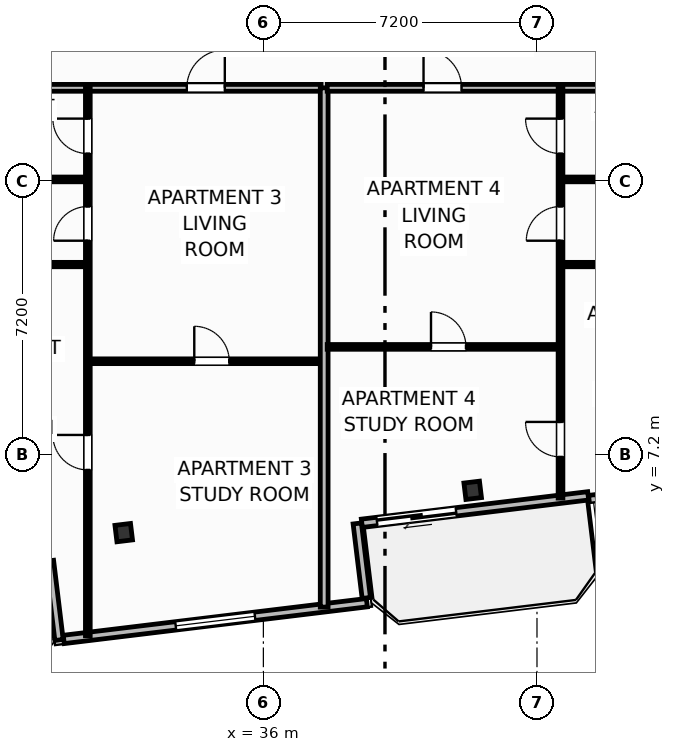
"""IFC4 building model, lengths in metres.
Left out: names, types, materials, properties, quantities, classifications, styles, units other than length and angle.
Written with IfcOpenShell. Run it as: python <this file> out.ifc"""

import sys

from ifc_helpers import new_model, si_unit, direction, frame, frame_2d, origin, origin_2d, place, context, subcontext, project, spatial, rectangle, i_section, extrude, element, fill, save


model = new_model("IFC4")
c1 = context("Model", 3, precision=1e-05, world=origin(), true_north=direction((0.0, 1.0)))
c2 = subcontext(c1, "Body", "Model", "MODEL_VIEW")
j1 = project(units=[si_unit("LENGTHUNIT", "METRE"), si_unit("PLANEANGLEUNIT", "RADIAN")], contexts=[c1])
p1 = place(None, origin())
s1 = spatial("IfcSite", under=j1, at=p1, CompositionType="ELEMENT")
p2 = place(p1, origin())
s2 = spatial("IfcBuilding", under=s1, at=p2, CompositionType="ELEMENT")
p3 = place(p2, frame((0.0, 0.0, 174.6)))
s3 = spatial("IfcBuildingStorey", under=s2, at=p3, CompositionType="ELEMENT", Elevation=174.6)
for number, where, z_axis, x_axis in (
    (1, (32.325, 5.146, 0.0), (0.0, 0.0, 1.0), (0.993, 0.12, 0.0)),
    (2, (41.508, 6.26, 0.0), (0.0, 0.0, 1.0), (0.993, 0.12, 0.0)),
):
    element("IfcColumn", number, at=place(p3, frame(where, z_axis=z_axis, x_axis=x_axis)), inside=s3, PredefinedType="COLUMN", context=c2, shape_type="SweptSolid", body=[
        extrude(i_section(OverallWidth=0.412, OverallDepth=0.435, WebThickness=0.036, FlangeThickness=0.057, FilletRadius=0.025, at=origin_2d()), origin(), (0.0, 0.0, 1.0), 3.7),
    ])
p4 = place(p3, frame((44.548, 6.114, 0.0), z_axis=(0.0, 0.0, 1.0), x_axis=(-0.992735402148, -0.120318000826, 0.0)))
e3 = element("IfcWall", 3, at=p4, inside=s3, PredefinedType="SOLIDWALL", context=c2, shape_type="SweptSolid", body=[
    extrude(rectangle(XDim=6.0, YDim=0.22, at=frame_2d((3.0, 0.0))), origin(), (0.0, 0.0, 1.0), 2.73),
])
p5 = place(p4, frame((3.5, 0.0, 0.0)))
e4 = element("IfcOpeningElement", 4, at=p5, cuts=e3, PredefinedType="OPENING", context=c2, shape_type="SweptSolid", body=[
    extrude(rectangle(XDim=2.1, YDim=2.3, at=frame_2d((1.05, 1.15))), frame((0.0, 0.12, 0.0), z_axis=(0.0, -1.0, 0.0), x_axis=(1.0, 0.0, 0.0)), (0.0, 0.0, 1.0), 0.24),
])
p6 = place(p3, frame((30.37, 4.406, 0.0), z_axis=(0.0, 0.0, 1.0), x_axis=(0.120327895535, -0.992734202874, 0.0)))
e5 = element("IfcWall", 5, at=p6, inside=s3, PredefinedType="SOLIDWALL", context=c2, shape_type="SweptSolid", body=[
    extrude(rectangle(XDim=2.1, YDim=0.22, at=frame_2d((1.05, 0.0))), origin(), (0.0, 0.0, 1.0), 2.73),
])
p7 = place(p3, frame((30.747, 2.336, 0.0), z_axis=(0.0, 0.0, 1.0), x_axis=(0.992731032022, 0.120354052946, 0.0)))
e6 = element("IfcWall", 6, at=p7, inside=s3, PredefinedType="SOLIDWALL", context=c2, shape_type="SweptSolid", body=[
    extrude(rectangle(XDim=8.035, YDim=0.22, at=frame_2d((4.018, 0.0))), origin(), (0.0, 0.0, 1.0), 2.73),
])
p8 = place(p7, frame((2.968, 0.0, 0.8)))
e7 = element("IfcOpeningElement", 7, at=p8, cuts=e6, PredefinedType="OPENING", context=c2, shape_type="SweptSolid", body=[
    extrude(rectangle(XDim=2.1, YDim=1.75, at=frame_2d((1.05, 0.875))), frame((0.0, 0.12, 0.0), z_axis=(0.0, -1.0, 0.0), x_axis=(1.0, 0.0, 0.0)), (0.0, 0.0, 1.0), 0.24),
])
p9 = place(p3, frame((38.709, 3.427, 0.0), z_axis=(0.0, 0.0, 1.0), x_axis=(-0.120397815541, 0.992725725472, 0.0)))
e8 = element("IfcWall", 8, at=p9, inside=s3, PredefinedType="SOLIDWALL", context=c2, shape_type="SweptSolid", body=[
    extrude(rectangle(XDim=1.975, YDim=0.22, at=frame_2d((0.988, 0.0))), origin(), (0.0, 0.0, 1.0), 2.73),
])
p10 = place(p3, frame((44.666, 6.138, 0.0), z_axis=(0.0, 0.0, 1.0), x_axis=(0.120327895535, -0.992734202874, 0.0)))
e9 = element("IfcWall", 9, at=p10, inside=s3, PredefinedType="SOLIDWALL", context=c2, shape_type="SweptSolid", body=[
    extrude(rectangle(XDim=2.1, YDim=0.22, at=frame_2d((1.05, 0.0))), origin(), (0.0, 0.0, 1.0), 2.73),
])
p11 = place(p10, frame((0.2, 0.0, 0.8)))
e10 = element("IfcOpeningElement", 10, at=p11, cuts=e9, PredefinedType="OPENING", context=c2, shape_type="SweptSolid", body=[
    extrude(rectangle(XDim=1.15, YDim=1.4, at=frame_2d((0.575, 0.7))), frame((0.0, 0.12, 0.0), z_axis=(0.0, -1.0, 0.0), x_axis=(1.0, 0.0, 0.0)), (0.0, 0.0, 1.0), 0.24),
])
p12 = place(p3, frame((31.451, 9.656, 0.0), z_axis=(0.0, 0.0, 1.0), x_axis=(1.0, 0.0, 0.0)))
e11 = element("IfcWall", 11, at=p12, inside=s3, PredefinedType="PARTITIONING", context=c2, shape_type="SweptSolid", body=[
    extrude(rectangle(XDim=6.069, YDim=0.125, at=frame_2d((3.035, 0.0))), origin(), (0.0, 0.0, 1.0), 3.45),
])
p13 = place(p12, frame((2.731, 0.0, 0.0)))
e12 = element("IfcOpeningElement", 12, at=p13, cuts=e11, PredefinedType="OPENING", context=c2, shape_type="SweptSolid", body=[
    extrude(rectangle(XDim=0.92, YDim=2.05, at=frame_2d((0.46, 1.025))), frame((0.0, 0.073, 0.0), z_axis=(0.0, -1.0, 0.0), x_axis=(1.0, 0.0, 0.0)), (0.0, 0.0, 1.0), 0.145),
])
p14 = place(p3, frame((26.88, 16.85, 0.0), z_axis=(0.0, 0.0, 1.0), x_axis=(1.0, 0.0, 0.0)))
e13 = element("IfcWall", 13, at=p14, inside=s3, PredefinedType="PARTITIONING", context=c2, shape_type="SweptSolid", body=[
    extrude(rectangle(XDim=10.64, YDim=0.18, at=frame_2d((5.32, 0.0))), origin(), (0.0, 0.0, 1.0), 3.45),
])
p15 = place(p14, frame((7.105, 0.0, 0.0)))
e14 = element("IfcOpeningElement", 14, at=p15, cuts=e13, PredefinedType="OPENING", context=c2, shape_type="SweptSolid", body=[
    extrude(rectangle(XDim=1.0, YDim=2.2, at=frame_2d((0.5, 1.1))), frame((0.0, 0.1, 0.0), z_axis=(0.0, -1.0, 0.0), x_axis=(1.0, 0.0, 0.0)), (0.0, 0.0, 1.0), 0.2),
])
p16 = place(p3, frame((31.381, 2.433, 0.0), z_axis=(0.0, 0.0, 1.0), x_axis=(0.0, 1.0, 0.0)))
e15 = element("IfcWall", 15, at=p16, inside=s3, PredefinedType="PARTITIONING", context=c2, shape_type="SweptSolid", body=[
    extrude(rectangle(XDim=14.417, YDim=0.125, at=frame_2d((7.208, 0.0))), origin(), (0.0, 0.0, 1.0), 3.45),
])
p17 = place(p16, frame((4.364, 0.0, 0.0)))
e16 = element("IfcOpeningElement", 16, at=p17, cuts=e15, PredefinedType="OPENING", context=c2, shape_type="SweptSolid", body=[
    extrude(rectangle(XDim=0.92, YDim=2.05, at=frame_2d((0.46, 1.025))), frame((0.0, 0.073, 0.0), z_axis=(0.0, -1.0, 0.0), x_axis=(1.0, 0.0, 0.0)), (0.0, 0.0, 1.0), 0.145),
])
p18 = place(p16, frame((10.395, 0.0, 0.0)))
e17 = element("IfcOpeningElement", 17, at=p18, cuts=e15, PredefinedType="OPENING", context=c2, shape_type="SweptSolid", body=[
    extrude(rectangle(XDim=0.9, YDim=2.05, at=frame_2d((0.45, 1.025))), frame((0.0, 0.073, 0.0), z_axis=(0.0, -1.0, 0.0), x_axis=(1.0, 0.0, 0.0)), (0.0, 0.0, 1.0), 0.145),
])
p19 = place(p16, frame((12.687, 0.0, 0.0)))
e18 = element("IfcOpeningElement", 18, at=p19, cuts=e15, PredefinedType="OPENING", context=c2, shape_type="SweptSolid", body=[
    extrude(rectangle(XDim=0.92, YDim=2.05, at=frame_2d((0.46, 1.025))), frame((0.0, 0.073, 0.0), z_axis=(0.0, -1.0, 0.0), x_axis=(1.0, 0.0, 0.0)), (0.0, 0.0, 1.0), 0.145),
])
p20 = place(p3, frame((26.88, 14.44, 0.0), z_axis=(0.0, 0.0, 1.0), x_axis=(1.0, 0.0, 0.0)))
e19 = element("IfcWall", 19, at=p20, inside=s3, PredefinedType="PARTITIONING", context=c2, shape_type="SweptSolid", body=[
    extrude(rectangle(XDim=4.431, YDim=0.125, at=frame_2d((2.215, 0.0))), origin(), (0.0, 0.0, 1.0), 3.45),
])
p21 = place(p3, frame((26.88, 12.2, 0.0), z_axis=(0.0, 0.0, 1.0), x_axis=(1.0, 0.0, 0.0)))
e20 = element("IfcWall", 20, at=p21, inside=s3, PredefinedType="PARTITIONING", context=c2, shape_type="SweptSolid", body=[
    extrude(rectangle(XDim=4.431, YDim=0.115, at=frame_2d((2.215, 0.0))), origin(), (0.0, 0.0, 1.0), 3.45),
])
p22 = place(p3, frame((37.6, 3.187, 0.0), z_axis=(0.0, 0.0, 1.0), x_axis=(0.0, 1.0, 0.0)))
e21 = element("IfcWall", 21, at=p22, inside=s3, PredefinedType="PARTITIONING", context=c2, shape_type="SweptSolid", body=[
    extrude(rectangle(XDim=13.663, YDim=0.205, at=frame_2d((6.832, 0.0))), origin(), (0.0, 0.0, 1.0), 3.45),
])
p23 = place(p3, frame((37.68, 10.033, 0.0), z_axis=(0.0, 0.0, 1.0), x_axis=(1.0, 0.0, 0.0)))
e22 = element("IfcWall", 22, at=p23, inside=s3, PredefinedType="PARTITIONING", context=c2, shape_type="SweptSolid", body=[
    extrude(rectangle(XDim=6.069, YDim=0.125, at=frame_2d((3.035, 0.0))), origin(), (0.0, 0.0, 1.0), 3.45),
])
p24 = place(p23, frame((2.731, 0.0, 0.0)))
e23 = element("IfcOpeningElement", 23, at=p24, cuts=e22, PredefinedType="OPENING", context=c2, shape_type="SweptSolid", body=[
    extrude(rectangle(XDim=0.92, YDim=2.05, at=frame_2d((0.46, 1.025))), frame((0.0, 0.073, 0.0), z_axis=(0.0, -1.0, 0.0), x_axis=(1.0, 0.0, 0.0)), (0.0, 0.0, 1.0), 0.145),
])
p25 = place(p3, frame((37.68, 16.85, 0.0), z_axis=(0.0, 0.0, 1.0), x_axis=(1.0, 0.0, 0.0)))
e24 = element("IfcWall", 24, at=p25, inside=s3, PredefinedType="PARTITIONING", context=c2, shape_type="SweptSolid", body=[
    extrude(rectangle(XDim=10.64, YDim=0.18, at=frame_2d((5.32, 0.0))), origin(), (0.0, 0.0, 1.0), 3.45),
])
p26 = place(p25, frame((2.535, 0.0, 0.0)))
e25 = element("IfcOpeningElement", 25, at=p26, cuts=e24, PredefinedType="OPENING", context=c2, shape_type="SweptSolid", body=[
    extrude(rectangle(XDim=1.0, YDim=2.2, at=frame_2d((0.5, 1.1))), frame((0.0, 0.1, 0.0), z_axis=(0.0, -1.0, 0.0), x_axis=(1.0, 0.0, 0.0)), (0.0, 0.0, 1.0), 0.2),
])
p27 = place(p3, frame((43.819, 6.056, 0.0), z_axis=(0.0, 0.0, 1.0), x_axis=(0.0, 1.0, 0.0)))
e26 = element("IfcWall", 26, at=p27, inside=s3, PredefinedType="PARTITIONING", context=c2, shape_type="SweptSolid", body=[
    extrude(rectangle(XDim=10.794, YDim=0.125, at=frame_2d((5.397, 0.0))), origin(), (0.0, 0.0, 1.0), 2.662),
])
p28 = place(p27, frame((1.083, 0.0, 0.0)))
e27 = element("IfcOpeningElement", 27, at=p28, cuts=e26, PredefinedType="OPENING", context=c2, shape_type="SweptSolid", body=[
    extrude(rectangle(XDim=0.92, YDim=2.05, at=frame_2d((0.46, 1.025))), frame((0.0, 0.073, 0.0), z_axis=(0.0, -1.0, 0.0), x_axis=(1.0, 0.0, 0.0)), (0.0, 0.0, 1.0), 0.145),
])
p29 = place(p27, frame((6.771, 0.0, 0.0)))
e28 = element("IfcOpeningElement", 28, at=p29, cuts=e26, PredefinedType="OPENING", context=c2, shape_type="SweptSolid", body=[
    extrude(rectangle(XDim=0.9, YDim=2.05, at=frame_2d((0.45, 1.025))), frame((0.0, 0.073, 0.0), z_axis=(0.0, -1.0, 0.0), x_axis=(1.0, 0.0, 0.0)), (0.0, 0.0, 1.0), 0.145),
])
p30 = place(p27, frame((9.064, 0.0, 0.0)))
e29 = element("IfcOpeningElement", 29, at=p30, cuts=e26, PredefinedType="OPENING", context=c2, shape_type="SweptSolid", body=[
    extrude(rectangle(XDim=0.92, YDim=2.05, at=frame_2d((0.46, 1.025))), frame((0.0, 0.073, 0.0), z_axis=(0.0, -1.0, 0.0), x_axis=(1.0, 0.0, 0.0)), (0.0, 0.0, 1.0), 0.145),
])
p31 = place(p3, frame((43.889, 14.44, 0.0), z_axis=(0.0, 0.0, 1.0), x_axis=(1.0, 0.0, 0.0)))
e30 = element("IfcWall", 30, at=p31, inside=s3, PredefinedType="PARTITIONING", context=c2, shape_type="SweptSolid", body=[
    extrude(rectangle(XDim=4.431, YDim=0.125, at=frame_2d((2.215, 0.0))), origin(), (0.0, 0.0, 1.0), 3.45),
])
p32 = place(p3, frame((43.889, 12.2, 0.0), z_axis=(0.0, 0.0, 1.0), x_axis=(1.0, 0.0, 0.0)))
e31 = element("IfcWall", 31, at=p32, inside=s3, PredefinedType="PARTITIONING", context=c2, shape_type="SweptSolid", body=[
    extrude(rectangle(XDim=4.431, YDim=0.115, at=frame_2d((2.215, 0.0))), origin(), (0.0, 0.0, 1.0), 3.45),
])
p33 = place(p5, origin())
e32 = element("IfcDoor", 32, at=p33, inside=s3, OperationType="SLIDING_TO_LEFT", PredefinedType="DOOR", context=c2, shape_type="SweptSolid", body=[
    extrude(rectangle(XDim=2.1, YDim=2.3, at=frame_2d((1.05, 1.15))), frame((0.0, 0.025, 0.0), z_axis=(0.0, -1.0, 0.0), x_axis=(1.0, 0.0, 0.0)), (0.0, 0.0, 1.0), 0.05),
])
fill(e4, e32)
p34 = place(p8, origin())
e33 = element("IfcWindow", 33, at=p34, inside=s3, PartitioningType="SINGLE_PANEL", PredefinedType="WINDOW", context=c2, shape_type="SweptSolid", body=[
    extrude(rectangle(XDim=2.1, YDim=1.75, at=frame_2d((1.05, 0.875))), frame((0.0, 0.03, 0.0), z_axis=(0.0, -1.0, 0.0), x_axis=(1.0, 0.0, 0.0)), (0.0, 0.0, 1.0), 0.06),
])
fill(e7, e33)
p35 = place(p13, origin())
e34 = element("IfcDoor", 34, at=p35, inside=s3, OperationType="SINGLE_SWING_LEFT", PredefinedType="DOOR", context=c2, shape_type="SweptSolid", body=[
    extrude(rectangle(XDim=0.92, YDim=2.05, at=frame_2d((0.46, 1.025))), frame((0.0, 0.025, 0.0), z_axis=(0.0, -1.0, 0.0), x_axis=(1.0, 0.0, 0.0)), (0.0, 0.0, 1.0), 0.05),
])
fill(e12, e34)
p36 = place(p15, origin())
e35 = element("IfcDoor", 35, at=p36, inside=s3, OperationType="SINGLE_SWING_RIGHT", PredefinedType="DOOR", context=c2, shape_type="SweptSolid", body=[
    extrude(rectangle(XDim=1.0, YDim=2.2, at=frame_2d((0.5, 1.1))), frame((0.0, 0.025, 0.0), z_axis=(0.0, -1.0, 0.0), x_axis=(1.0, 0.0, 0.0)), (0.0, 0.0, 1.0), 0.05),
])
fill(e14, e35)
p37 = place(p17, origin())
e36 = element("IfcDoor", 36, at=p37, inside=s3, OperationType="SINGLE_SWING_RIGHT", PredefinedType="DOOR", context=c2, shape_type="SweptSolid", body=[
    extrude(rectangle(XDim=0.92, YDim=2.05, at=frame_2d((0.46, 1.025))), frame((0.0, 0.025, 0.0), z_axis=(0.0, -1.0, 0.0), x_axis=(1.0, 0.0, 0.0)), (0.0, 0.0, 1.0), 0.05),
])
fill(e16, e36)
p38 = place(p18, origin())
e37 = element("IfcDoor", 37, at=p38, inside=s3, OperationType="SINGLE_SWING_LEFT", PredefinedType="DOOR", context=c2, shape_type="SweptSolid", body=[
    extrude(rectangle(XDim=0.9, YDim=2.05, at=frame_2d((0.45, 1.025))), frame((0.0, 0.025, 0.0), z_axis=(0.0, -1.0, 0.0), x_axis=(1.0, 0.0, 0.0)), (0.0, 0.0, 1.0), 0.05),
])
fill(e17, e37)
p39 = place(p19, origin())
e38 = element("IfcDoor", 38, at=p39, inside=s3, OperationType="SINGLE_SWING_RIGHT", PredefinedType="DOOR", context=c2, shape_type="SweptSolid", body=[
    extrude(rectangle(XDim=0.92, YDim=2.05, at=frame_2d((0.46, 1.025))), frame((0.0, 0.025, 0.0), z_axis=(0.0, -1.0, 0.0), x_axis=(1.0, 0.0, 0.0)), (0.0, 0.0, 1.0), 0.05),
])
fill(e18, e38)
p40 = place(p24, origin())
e39 = element("IfcDoor", 39, at=p40, inside=s3, OperationType="SINGLE_SWING_LEFT", PredefinedType="DOOR", context=c2, shape_type="SweptSolid", body=[
    extrude(rectangle(XDim=0.92, YDim=2.05, at=frame_2d((0.46, 1.025))), frame((0.0, 0.025, 0.0), z_axis=(0.0, -1.0, 0.0), x_axis=(1.0, 0.0, 0.0)), (0.0, 0.0, 1.0), 0.05),
])
fill(e23, e39)
p41 = place(p26, origin())
e40 = element("IfcDoor", 40, at=p41, inside=s3, OperationType="SINGLE_SWING_LEFT", PredefinedType="DOOR", context=c2, shape_type="SweptSolid", body=[
    extrude(rectangle(XDim=1.0, YDim=2.2, at=frame_2d((0.5, 1.1))), frame((0.0, 0.025, 0.0), z_axis=(0.0, -1.0, 0.0), x_axis=(1.0, 0.0, 0.0)), (0.0, 0.0, 1.0), 0.05),
])
fill(e25, e40)
p42 = place(p28, origin())
e41 = element("IfcDoor", 41, at=p42, inside=s3, OperationType="SINGLE_SWING_RIGHT", PredefinedType="DOOR", context=c2, shape_type="SweptSolid", body=[
    extrude(rectangle(XDim=0.92, YDim=2.05, at=frame_2d((0.46, 1.025))), frame((0.0, 0.025, 0.0), z_axis=(0.0, -1.0, 0.0), x_axis=(1.0, 0.0, 0.0)), (0.0, 0.0, 1.0), 0.05),
])
fill(e27, e41)
p43 = place(p29, origin())
e42 = element("IfcDoor", 42, at=p43, inside=s3, OperationType="SINGLE_SWING_LEFT", PredefinedType="DOOR", context=c2, shape_type="SweptSolid", body=[
    extrude(rectangle(XDim=0.9, YDim=2.05, at=frame_2d((0.45, 1.025))), frame((0.0, 0.025, 0.0), z_axis=(0.0, -1.0, 0.0), x_axis=(1.0, 0.0, 0.0)), (0.0, 0.0, 1.0), 0.05),
])
fill(e28, e42)
p44 = place(p30, origin())
e43 = element("IfcDoor", 43, at=p44, inside=s3, OperationType="SINGLE_SWING_RIGHT", PredefinedType="DOOR", context=c2, shape_type="SweptSolid", body=[
    extrude(rectangle(XDim=0.92, YDim=2.05, at=frame_2d((0.46, 1.025))), frame((0.0, 0.025, 0.0), z_axis=(0.0, -1.0, 0.0), x_axis=(1.0, 0.0, 0.0)), (0.0, 0.0, 1.0), 0.05),
])
fill(e29, e43)
p45 = place(p11, origin())
e44 = element("IfcWindow", 44, at=p45, inside=s3, PartitioningType="SINGLE_PANEL", PredefinedType="WINDOW", context=c2, shape_type="SweptSolid", body=[
    extrude(rectangle(XDim=1.15, YDim=1.4, at=frame_2d((0.575, 0.7))), frame((0.0, 0.03, 0.0), z_axis=(0.0, -1.0, 0.0), x_axis=(1.0, 0.0, 0.0)), (0.0, 0.0, 1.0), 0.06),
])
fill(e10, e44)
save(model, sys.argv[1])
